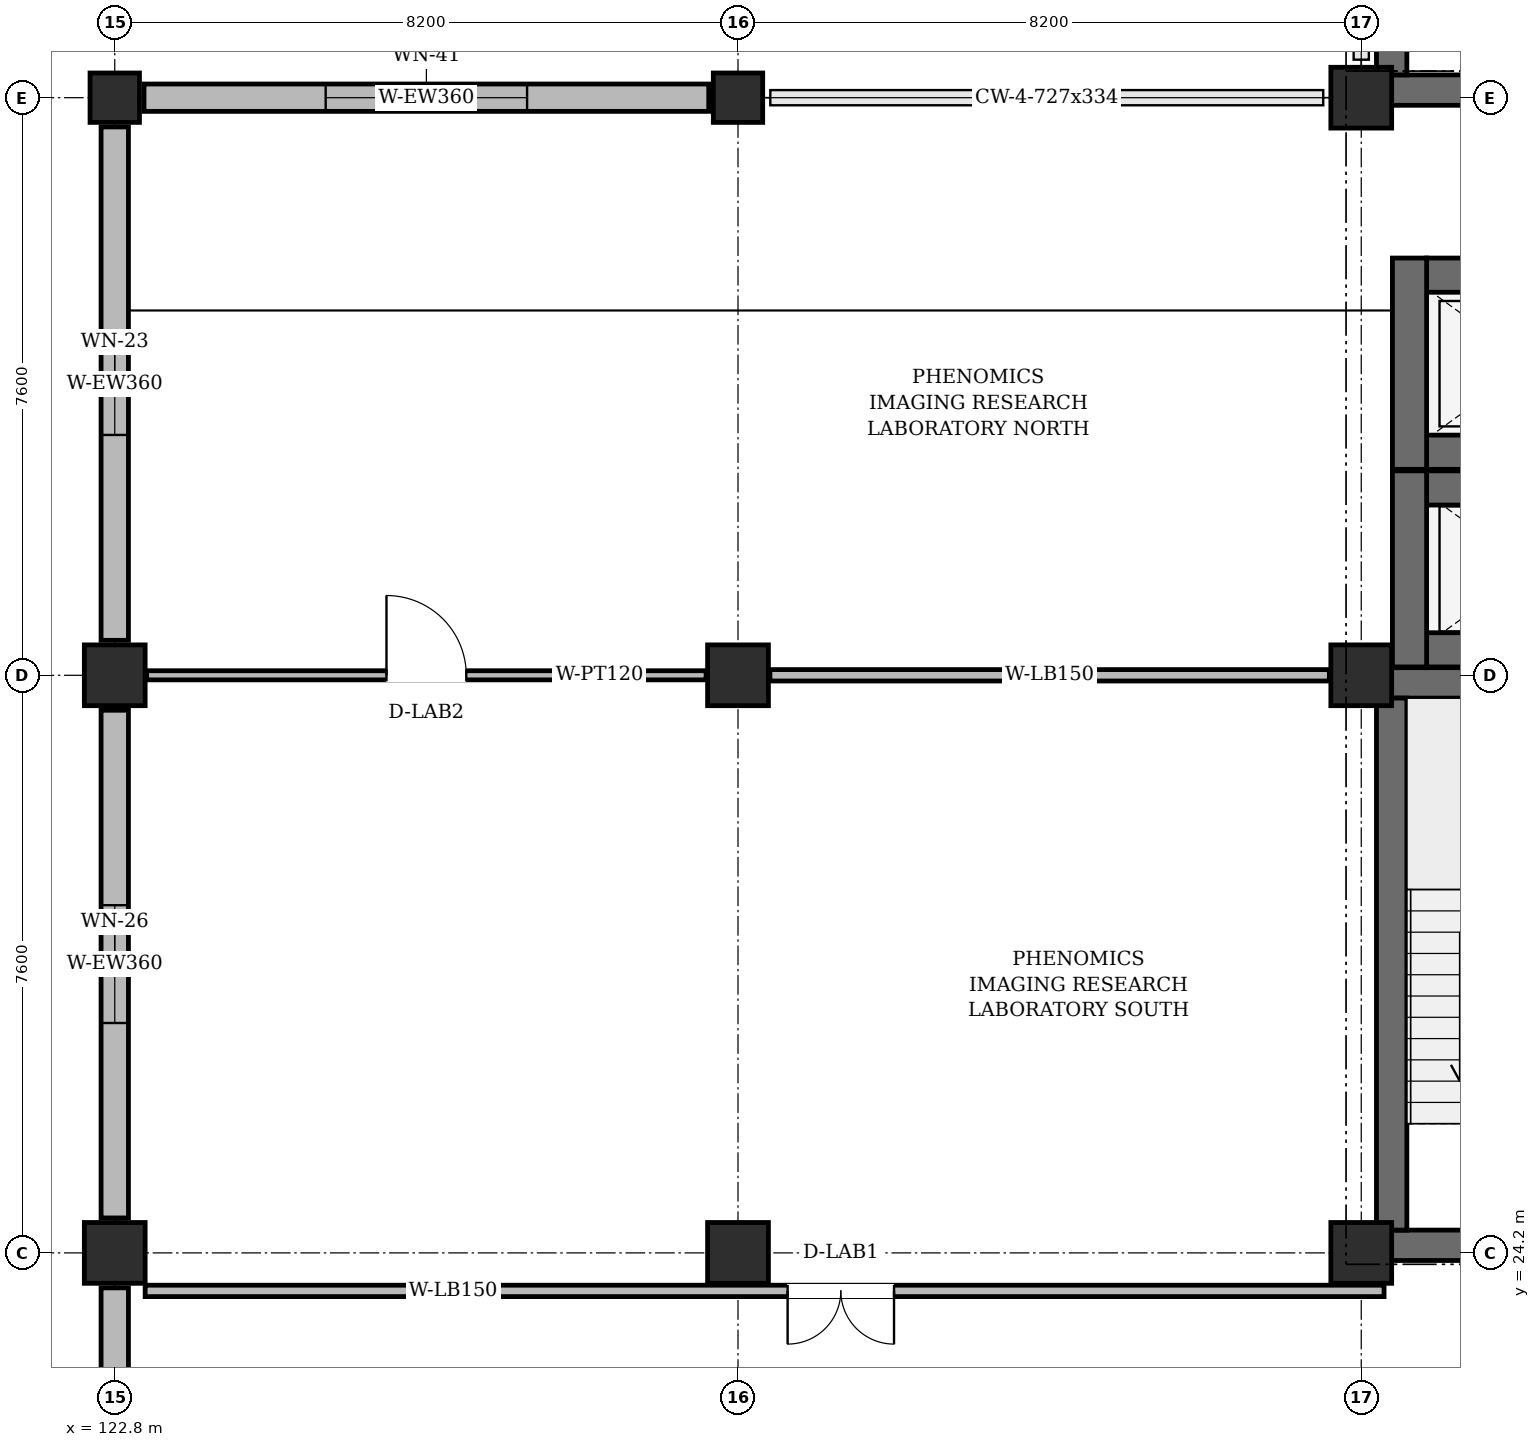
"""IFC4 building model, lengths in metres.
Left out: names, types, materials, properties, quantities, classifications, styles, units other than length and angle.
Written with IfcOpenShell. Run it as: python <this file> out.ifc"""

import sys

from ifc_helpers import new_model, si_unit, direction, frame, frame_2d, origin, origin_2d, place, context, subcontext, project, spatial, rectangle, extrude, element, fill, save


model = new_model("IFC4")
c1 = context("Model", 3, precision=1e-05, world=origin(), true_north=direction((0.0, 1.0)))
c2 = subcontext(c1, "Body", "Model", "MODEL_VIEW")
j1 = project(units=[si_unit("LENGTHUNIT", "METRE"), si_unit("PLANEANGLEUNIT", "RADIAN")], contexts=[c1])
p1 = place(None, origin())
s1 = spatial("IfcSite", under=j1, at=p1, CompositionType="ELEMENT")
p2 = place(p1, origin())
s2 = spatial("IfcBuilding", under=s1, at=p2, CompositionType="ELEMENT")
p3 = place(p2, frame((0.0, 0.0, 40.8)))
s3 = spatial("IfcBuildingStorey", under=s2, at=p3, CompositionType="ELEMENT", Elevation=40.8)
for number, where, z_axis, x_axis in (
    (1, (122.8, 24.2, 0.0), (0.0, 0.0, 1.0), (1.0, 0.0, 0.0)),
    (2, (122.8, 31.8, 0.0), (0.0, 0.0, 1.0), (1.0, 0.0, 0.0)),
):
    element("IfcColumn", number, at=place(p3, frame(where, z_axis=z_axis, x_axis=x_axis)), inside=s3, PredefinedType="COLUMN", context=c2, shape_type="SweptSolid", body=[
        extrude(rectangle(XDim=0.8, YDim=0.8, at=origin_2d()), origin(), (0.0, 0.0, 1.0), 3.94),
    ])
p4 = place(p3, frame((122.8, 39.4, 0.0), z_axis=(0.0, 0.0, 1.0), x_axis=(1.0, 0.0, 0.0)))
e3 = element("IfcColumn", 3, at=p4, inside=s3, PredefinedType="COLUMN", context=c2, shape_type="SweptSolid", body=[
    extrude(rectangle(XDim=0.65, YDim=0.65, at=origin_2d()), origin(), (0.0, 0.0, 1.0), 3.94),
])
for number, where, z_axis, x_axis in (
    (4, (131.0, 24.2, 0.0), (0.0, 0.0, 1.0), (1.0, 0.0, 0.0)),
    (5, (131.0, 31.8, 0.0), (0.0, 0.0, 1.0), (1.0, 0.0, 0.0)),
):
    element("IfcColumn", number, at=place(p3, frame(where, z_axis=z_axis, x_axis=x_axis)), inside=s3, PredefinedType="COLUMN", context=c2, shape_type="SweptSolid", body=[
        extrude(rectangle(XDim=0.8, YDim=0.8, at=origin_2d()), origin(), (0.0, 0.0, 1.0), 3.94),
    ])
p5 = place(p3, frame((131.0, 39.4, 0.0), z_axis=(0.0, 0.0, 1.0), x_axis=(1.0, 0.0, 0.0)))
e6 = element("IfcColumn", 6, at=p5, inside=s3, PredefinedType="COLUMN", context=c2, shape_type="SweptSolid", body=[
    extrude(rectangle(XDim=0.65, YDim=0.65, at=origin_2d()), origin(), (0.0, 0.0, 1.0), 3.94),
])
for number, where, z_axis, x_axis in (
    (7, (139.2, 24.2, 0.0), (0.0, 0.0, 1.0), (1.0, 0.0, 0.0)),
    (8, (139.2, 31.8, 0.0), (0.0, 0.0, 1.0), (1.0, 0.0, 0.0)),
    (9, (139.2, 39.4, 0.0), (0.0, 0.0, 1.0), (1.0, 0.0, 0.0)),
):
    element("IfcColumn", number, at=place(p3, frame(where, z_axis=z_axis, x_axis=x_axis)), inside=s3, PredefinedType="COLUMN", context=c2, shape_type="SweptSolid", body=[
        extrude(rectangle(XDim=0.8, YDim=0.8, at=origin_2d()), origin(), (0.0, 0.0, 1.0), 3.94),
    ])
p6 = place(p3, frame((130.615, 39.4, 0.0), z_axis=(0.0, 0.0, 1.0), x_axis=(-1.0, 0.0, 0.0)))
e10 = element("IfcWall", 10, at=p6, inside=s3, PredefinedType="SOLIDWALL", context=c2, shape_type="SweptSolid", body=[
    extrude(rectangle(XDim=7.43, YDim=0.36, at=frame_2d((3.715, 0.0))), origin(), (0.0, 0.0, 1.0), 3.325),
])
p7 = place(p6, frame((2.39, 0.0, 0.95)))
e11 = element("IfcOpeningElement", 11, at=p7, cuts=e10, PredefinedType="OPENING", context=c2, shape_type="SweptSolid", body=[
    extrude(rectangle(XDim=2.65, YDim=1.25, at=frame_2d((1.325, 0.625))), frame((0.0, 0.192, 0.0), z_axis=(0.0, -1.0, 0.0), x_axis=(1.0, 0.0, 0.0)), (0.0, 0.0, 1.0), 0.384),
])
p8 = place(p3, frame((122.8, 39.015, 0.0), z_axis=(0.0, 0.0, 1.0), x_axis=(0.0, -1.0, 0.0)))
e12 = element("IfcWall", 12, at=p8, inside=s3, PredefinedType="SOLIDWALL", context=c2, shape_type="SweptSolid", body=[
    extrude(rectangle(XDim=6.755, YDim=0.36, at=frame_2d((3.377, 0.0))), origin(), (0.0, 0.0, 1.0), 3.325),
])
p9 = place(p8, frame((2.702, 0.0, 0.95)))
e13 = element("IfcOpeningElement", 13, at=p9, cuts=e12, PredefinedType="OPENING", context=c2, shape_type="SweptSolid", body=[
    extrude(rectangle(XDim=1.35, YDim=1.75, at=frame_2d((0.675, 0.875))), frame((0.0, 0.192, 0.0), z_axis=(0.0, -1.0, 0.0), x_axis=(1.0, 0.0, 0.0)), (0.0, 0.0, 1.0), 0.384),
])
p10 = place(p3, frame((122.8, 31.34, 0.0), z_axis=(0.0, 0.0, 1.0), x_axis=(0.0, -1.0, 0.0)))
e14 = element("IfcWall", 14, at=p10, inside=s3, PredefinedType="SOLIDWALL", context=c2, shape_type="SweptSolid", body=[
    extrude(rectangle(XDim=6.68, YDim=0.36, at=frame_2d((3.34, 0.0))), origin(), (0.0, 0.0, 1.0), 3.325),
])
p11 = place(p10, frame((2.565, 0.0, 0.95)))
e15 = element("IfcOpeningElement", 15, at=p11, cuts=e14, PredefinedType="OPENING", context=c2, shape_type="SweptSolid", body=[
    extrude(rectangle(XDim=1.55, YDim=1.5, at=frame_2d((0.775, 0.75))), frame((0.0, 0.192, 0.0), z_axis=(0.0, -1.0, 0.0), x_axis=(1.0, 0.0, 0.0)), (0.0, 0.0, 1.0), 0.384),
])
p12 = place(p3, frame((122.8, 23.74, 0.0), z_axis=(0.0, 0.0, 1.0), x_axis=(0.0, -1.0, 0.0)))
e16 = element("IfcWall", 16, at=p12, inside=s3, PredefinedType="SOLIDWALL", context=c2, shape_type="SweptSolid", body=[
    extrude(rectangle(XDim=6.68, YDim=0.36, at=frame_2d((3.34, 0.0))), origin(), (0.0, 0.0, 1.0), 3.325),
])
p13 = place(p12, frame((2.89, 0.0, 0.95)))
e17 = element("IfcOpeningElement", 17, at=p13, cuts=e16, PredefinedType="OPENING", context=c2, shape_type="SweptSolid", body=[
    extrude(rectangle(XDim=0.9, YDim=2.1, at=frame_2d((0.45, 1.05))), frame((0.0, 0.192, 0.0), z_axis=(0.0, -1.0, 0.0), x_axis=(1.0, 0.0, 0.0)), (0.0, 0.0, 1.0), 0.384),
])
p14 = place(p3, frame((139.4, 24.3, 0.0), z_axis=(0.0, 0.0, 1.0), x_axis=(1.0, 0.0, 0.0)))
e18 = element("IfcWall", 18, at=p14, inside=s3, PredefinedType="SHEAR", context=c2, shape_type="SweptSolid", body=[
    extrude(rectangle(XDim=3.8, YDim=0.4, at=frame_2d((1.9, 0.0))), origin(), (0.0, 0.0, 1.0), 3.94),
])
p15 = place(p14, frame((1.3, 0.0, 0.0)))
e19 = element("IfcOpeningElement", 19, at=p15, cuts=e18, PredefinedType="OPENING", context=c2, shape_type="SweptSolid", body=[
    extrude(rectangle(XDim=1.2, YDim=2.2, at=frame_2d((0.6, 1.1))), frame((0.0, 0.212, 0.0), z_axis=(0.0, -1.0, 0.0), x_axis=(1.0, 0.0, 0.0)), (0.0, 0.0, 1.0), 0.424),
])
p16 = place(p3, frame((139.4, 31.7, 0.0), z_axis=(0.0, 0.0, 1.0), x_axis=(1.0, 0.0, 0.0)))
e20 = element("IfcWall", 20, at=p16, inside=s3, PredefinedType="SHEAR", context=c2, shape_type="SweptSolid", body=[
    extrude(rectangle(XDim=3.8, YDim=0.4, at=frame_2d((1.9, 0.0))), origin(), (0.0, 0.0, 1.0), 3.94),
])
p17 = place(p3, frame((139.6, 24.5, 0.0), z_axis=(0.0, 0.0, 1.0), x_axis=(0.0, 1.0, 0.0)))
e21 = element("IfcWall", 21, at=p17, inside=s3, PredefinedType="SHEAR", context=c2, shape_type="SweptSolid", body=[
    extrude(rectangle(XDim=7.0, YDim=0.4, at=frame_2d((3.5, 0.0))), origin(), (0.0, 0.0, 1.0), 3.94),
])
p18 = place(p3, frame((139.4, 39.5, 0.0), z_axis=(0.0, 0.0, 1.0), x_axis=(1.0, 0.0, 0.0)))
e22 = element("IfcWall", 22, at=p18, inside=s3, PredefinedType="SHEAR", context=c2, shape_type="SweptSolid", body=[
    extrude(rectangle(XDim=3.8, YDim=0.4, at=frame_2d((1.9, 0.0))), origin(), (0.0, 0.0, 1.0), 3.94),
])
p19 = place(p18, frame((1.3, 0.0, 0.0)))
e23 = element("IfcOpeningElement", 23, at=p19, cuts=e22, PredefinedType="OPENING", context=c2, shape_type="SweptSolid", body=[
    extrude(rectangle(XDim=1.2, YDim=2.2, at=frame_2d((0.6, 1.1))), frame((0.0, 0.212, 0.0), z_axis=(0.0, -1.0, 0.0), x_axis=(1.0, 0.0, 0.0)), (0.0, 0.0, 1.0), 0.424),
])
p20 = place(p3, frame((139.6, 39.7, 0.0), z_axis=(0.0, 0.0, 1.0), x_axis=(0.0, 1.0, 0.0)))
e24 = element("IfcWall", 24, at=p20, inside=s3, PredefinedType="SHEAR", context=c2, shape_type="SweptSolid", body=[
    extrude(rectangle(XDim=7.0, YDim=0.4, at=frame_2d((3.5, 0.0))), origin(), (0.0, 0.0, 1.0), 3.94),
])
for number, where, z_axis, x_axis in (
    (25, (140.06, 32.135, 0.0), (0.0, 0.0, 1.0), (1.0, 0.0, 0.0)),
    (26, (140.06, 34.265, 0.0), (0.0, 0.0, 1.0), (1.0, 0.0, 0.0)),
):
    element("IfcWall", number, at=place(p3, frame(where, z_axis=z_axis, x_axis=x_axis)), inside=s3, PredefinedType="SHEAR", context=c2, shape_type="SweptSolid", body=[
        extrude(rectangle(XDim=2.74, YDim=0.45, at=frame_2d((1.37, 0.0))), origin(), (0.0, 0.0, 1.0), 3.94),
    ])
p21 = place(p3, frame((139.835, 31.91, 0.0), z_axis=(0.0, 0.0, 1.0), x_axis=(0.0, 1.0, 0.0)))
e27 = element("IfcWall", 27, at=p21, inside=s3, PredefinedType="SHEAR", context=c2, shape_type="SweptSolid", body=[
    extrude(rectangle(XDim=2.58, YDim=0.45, at=frame_2d((1.29, 0.0))), origin(), (0.0, 0.0, 1.0), 3.94),
])
for number, where, z_axis, x_axis in (
    (28, (140.06, 34.735, 0.0), (0.0, 0.0, 1.0), (1.0, 0.0, 0.0)),
    (29, (140.06, 37.065, 0.0), (0.0, 0.0, 1.0), (1.0, 0.0, 0.0)),
):
    element("IfcWall", number, at=place(p3, frame(where, z_axis=z_axis, x_axis=x_axis)), inside=s3, PredefinedType="SHEAR", context=c2, shape_type="SweptSolid", body=[
        extrude(rectangle(XDim=2.74, YDim=0.45, at=frame_2d((1.37, 0.0))), origin(), (0.0, 0.0, 1.0), 3.94),
    ])
p22 = place(p3, frame((139.835, 34.51, 0.0), z_axis=(0.0, 0.0, 1.0), x_axis=(0.0, 1.0, 0.0)))
e30 = element("IfcWall", 30, at=p22, inside=s3, PredefinedType="SHEAR", context=c2, shape_type="SweptSolid", body=[
    extrude(rectangle(XDim=2.78, YDim=0.45, at=frame_2d((1.39, 0.0))), origin(), (0.0, 0.0, 1.0), 3.94),
])
p23 = place(p3, frame((123.2, 23.7, 0.0), z_axis=(0.0, 0.0, 1.0), x_axis=(1.0, 0.0, 0.0)))
e31 = element("IfcWall", 31, at=p23, inside=s3, PredefinedType="PARTITIONING", context=c2, shape_type="SweptSolid", body=[
    extrude(rectangle(XDim=16.3, YDim=0.15, at=frame_2d((8.15, 0.0))), origin(), (0.0, 0.0, 1.0), 3.805),
])
p24 = place(p23, frame((8.453, 0.0, 0.0)))
e32 = element("IfcOpeningElement", 32, at=p24, cuts=e31, PredefinedType="OPENING", context=c2, shape_type="SweptSolid", body=[
    extrude(rectangle(XDim=1.4, YDim=2.2, at=frame_2d((0.7, 1.1))), frame((0.0, 0.087, 0.0), z_axis=(0.0, -1.0, 0.0), x_axis=(1.0, 0.0, 0.0)), (0.0, 0.0, 1.0), 0.174),
])
p25 = place(p3, frame((123.22, 31.8, 0.0), z_axis=(0.0, 0.0, 1.0), x_axis=(1.0, 0.0, 0.0)))
e33 = element("IfcWall", 33, at=p25, inside=s3, PredefinedType="PARTITIONING", context=c2, shape_type="SweptSolid", body=[
    extrude(rectangle(XDim=7.36, YDim=0.12, at=frame_2d((3.68, 0.0))), origin(), (0.0, 0.0, 1.0), 3.275),
])
p26 = place(p25, frame((3.155, 0.0, 0.0)))
e34 = element("IfcOpeningElement", 34, at=p26, cuts=e33, PredefinedType="OPENING", context=c2, shape_type="SweptSolid", body=[
    extrude(rectangle(XDim=1.05, YDim=2.2, at=frame_2d((0.525, 1.1))), frame((0.0, 0.072, 0.0), z_axis=(0.0, -1.0, 0.0), x_axis=(1.0, 0.0, 0.0)), (0.0, 0.0, 1.0), 0.144),
])
p27 = place(p3, frame((131.42, 31.8, 0.0), z_axis=(0.0, 0.0, 1.0), x_axis=(1.0, 0.0, 0.0)))
e35 = element("IfcWall", 35, at=p27, inside=s3, PredefinedType="PARTITIONING", context=c2, shape_type="SweptSolid", body=[
    extrude(rectangle(XDim=7.36, YDim=0.15, at=frame_2d((3.68, 0.0))), origin(), (0.0, 0.0, 1.0), 3.275),
])
p28 = place(p7, origin())
e36 = element("IfcWindow", 36, at=p28, inside=s3, PartitioningType="DOUBLE_PANEL_VERTICAL", PredefinedType="WINDOW", context=c2, shape_type="SweptSolid", body=[
    extrude(rectangle(XDim=2.65, YDim=1.25, at=frame_2d((1.325, 0.625))), frame((0.0, 0.03, 0.0), z_axis=(0.0, -1.0, 0.0), x_axis=(1.0, 0.0, 0.0)), (0.0, 0.0, 1.0), 0.06),
])
fill(e11, e36)
p29 = place(p9, origin())
e37 = element("IfcWindow", 37, at=p29, inside=s3, PartitioningType="SINGLE_PANEL", PredefinedType="WINDOW", context=c2, shape_type="SweptSolid", body=[
    extrude(rectangle(XDim=1.35, YDim=1.75, at=frame_2d((0.675, 0.875))), frame((0.0, 0.03, 0.0), z_axis=(0.0, -1.0, 0.0), x_axis=(1.0, 0.0, 0.0)), (0.0, 0.0, 1.0), 0.06),
])
fill(e13, e37)
p30 = place(p11, origin())
e38 = element("IfcWindow", 38, at=p30, inside=s3, PartitioningType="DOUBLE_PANEL_VERTICAL", PredefinedType="WINDOW", context=c2, shape_type="SweptSolid", body=[
    extrude(rectangle(XDim=1.55, YDim=1.5, at=frame_2d((0.775, 0.75))), frame((0.0, 0.03, 0.0), z_axis=(0.0, -1.0, 0.0), x_axis=(1.0, 0.0, 0.0)), (0.0, 0.0, 1.0), 0.06),
])
fill(e15, e38)
p31 = place(p24, frame((1.4, 0.0, 0.0), z_axis=(0.0, 0.0, 1.0), x_axis=(-1.0, 0.0, 0.0)))
e39 = element("IfcDoor", 39, at=p31, inside=s3, OperationType="DOUBLE_DOOR_SINGLE_SWING", PredefinedType="DOOR", context=c2, shape_type="SweptSolid", body=[
    extrude(rectangle(XDim=1.4, YDim=2.2, at=frame_2d((0.7, 1.1))), frame((0.0, 0.025, 0.0), z_axis=(0.0, -1.0, 0.0), x_axis=(1.0, 0.0, 0.0)), (0.0, 0.0, 1.0), 0.05),
])
fill(e32, e39)
p32 = place(p26, origin())
e40 = element("IfcDoor", 40, at=p32, inside=s3, OperationType="SINGLE_SWING_LEFT", PredefinedType="DOOR", context=c2, shape_type="SweptSolid", body=[
    extrude(rectangle(XDim=1.05, YDim=2.2, at=frame_2d((0.525, 1.1))), frame((0.0, 0.025, 0.0), z_axis=(0.0, -1.0, 0.0), x_axis=(1.0, 0.0, 0.0)), (0.0, 0.0, 1.0), 0.05),
])
fill(e34, e40)
save(model, sys.argv[1])
